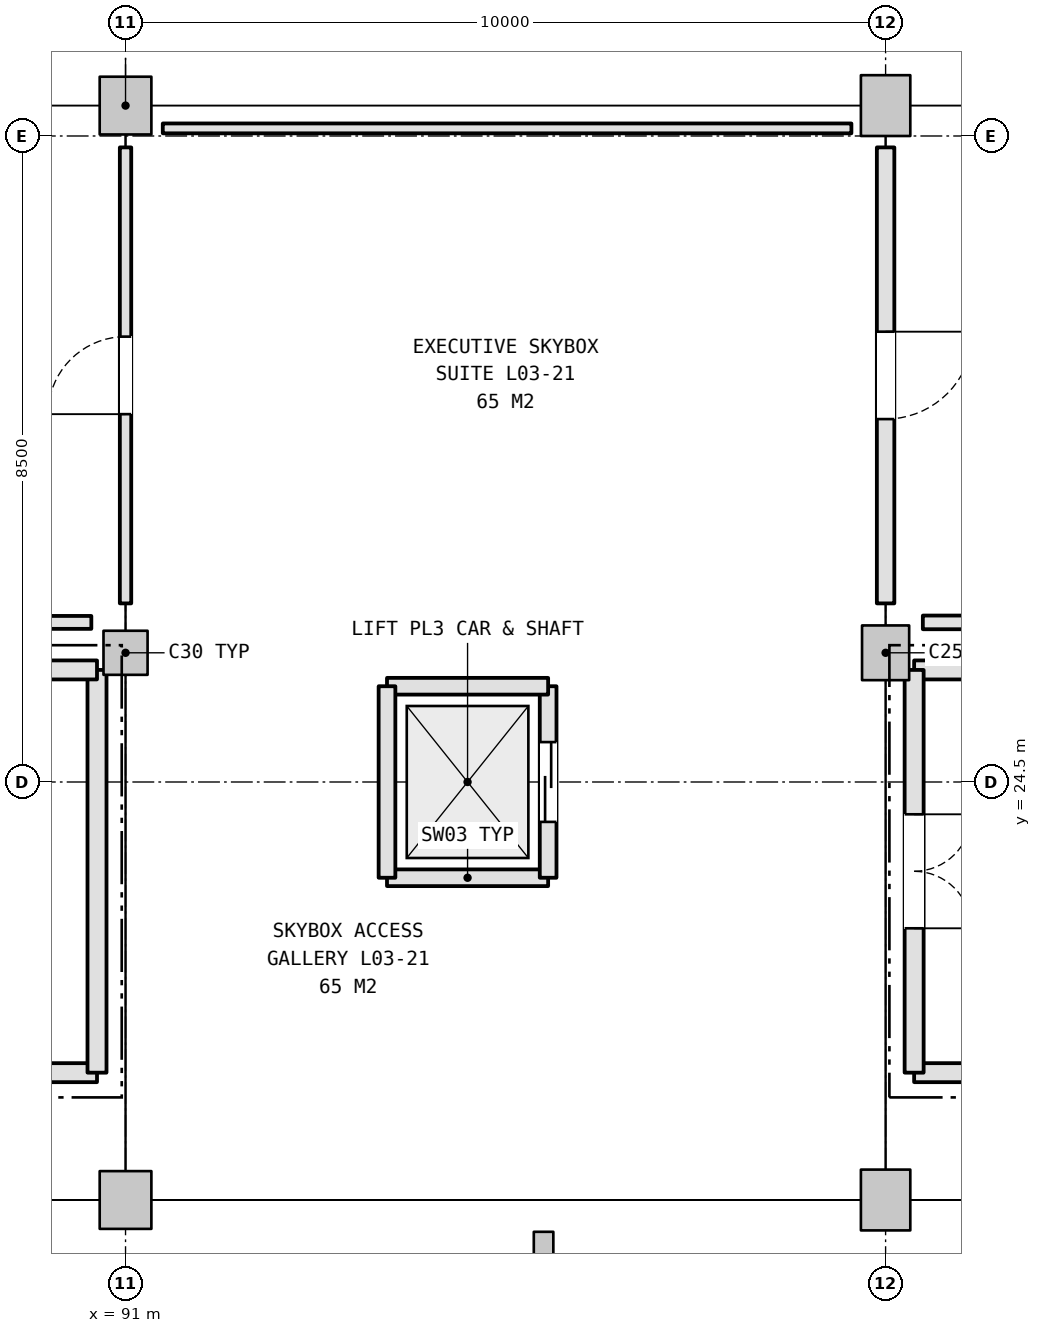
"""IFC4 building model, lengths in metres.
Left out: names, types, materials, properties, quantities, classifications, styles, units other than length and angle.
Written with IfcOpenShell. Run it as: python <this file> out.ifc"""

import sys

from ifc_helpers import new_model, si_unit, direction, frame, frame_2d, origin, origin_2d, place, context, subcontext, project, spatial, rectangle, i_section, extrude, element, fill, save


model = new_model("IFC4")
c1 = context("Model", 3, precision=1e-05, world=origin(), true_north=direction((0.0, 1.0)))
c2 = subcontext(c1, "Body", "Model", "MODEL_VIEW")
j1 = project(units=[si_unit("LENGTHUNIT", "METRE"), si_unit("PLANEANGLEUNIT", "RADIAN")], contexts=[c1])
p1 = place(None, origin())
s1 = spatial("IfcSite", under=j1, at=p1, CompositionType="ELEMENT")
p2 = place(p1, origin())
s2 = spatial("IfcBuilding", under=s1, at=p2, CompositionType="ELEMENT")
p3 = place(p2, frame((0.0, 0.0, 16.2)))
s3 = spatial("IfcBuildingStorey", under=s2, at=p3, CompositionType="ELEMENT", Elevation=16.2)
p4 = place(p3, frame((91.0, 33.4, 0.0), z_axis=(0.0, 0.0, 1.0), x_axis=(1.0, 0.0, 0.0)))
e1 = element("IfcColumn", 1, at=p4, inside=s3, PredefinedType="COLUMN", context=c2, shape_type="SweptSolid", body=[
    extrude(rectangle(XDim=0.68, YDim=0.76, at=origin_2d()), origin(), (0.0, 0.0, 1.0), 5.4),
])
p5 = place(p3, frame((91.0, 26.2, 0.0), z_axis=(0.0, 0.0, 1.0), x_axis=(1.0, 0.0, 0.0)))
e2 = element("IfcColumn", 2, at=p5, inside=s3, PredefinedType="COLUMN", context=c2, shape_type="SweptSolid", body=[
    extrude(rectangle(XDim=0.58, YDim=0.58, at=origin_2d()), origin(), (0.0, 0.0, 1.0), 5.4),
])
p6 = place(p3, frame((91.0, 19.0, 0.0), z_axis=(0.0, 0.0, 1.0), x_axis=(1.0, 0.0, 0.0)))
e3 = element("IfcColumn", 3, at=p6, inside=s3, PredefinedType="COLUMN", context=c2, shape_type="SweptSolid", body=[
    extrude(rectangle(XDim=0.68, YDim=0.76, at=origin_2d()), origin(), (0.0, 0.0, 1.0), 5.4),
])
p7 = place(p3, frame((101.0, 33.4, 0.0), z_axis=(0.0, 0.0, 1.0), x_axis=(1.0, 0.0, 0.0)))
e4 = element("IfcColumn", 4, at=p7, inside=s3, PredefinedType="COLUMN", context=c2, shape_type="SweptSolid", body=[
    extrude(rectangle(XDim=0.65, YDim=0.8, at=origin_2d()), origin(), (0.0, 0.0, 1.0), 5.4),
])
p8 = place(p3, frame((101.0, 26.2, 0.0), z_axis=(0.0, 0.0, 1.0), x_axis=(1.0, 0.0, 0.0)))
e5 = element("IfcColumn", 5, at=p8, inside=s3, PredefinedType="COLUMN", context=c2, shape_type="SweptSolid", body=[
    extrude(rectangle(XDim=0.62, YDim=0.72, at=origin_2d()), origin(), (0.0, 0.0, 1.0), 5.4),
])
p9 = place(p3, frame((101.0, 19.0, 0.0), z_axis=(0.0, 0.0, 1.0), x_axis=(1.0, 0.0, 0.0)))
e6 = element("IfcColumn", 6, at=p9, inside=s3, PredefinedType="COLUMN", context=c2, shape_type="SweptSolid", body=[
    extrude(rectangle(XDim=0.65, YDim=0.8, at=origin_2d()), origin(), (0.0, 0.0, 1.0), 5.4),
])
p10 = place(p3, frame((96.5, 18.4, 0.0), z_axis=(0.0, 0.0, 1.0), x_axis=(1.0, 0.0, 0.0)))
e7 = element("IfcColumn", 7, at=p10, inside=s3, PredefinedType="COLUMN", context=c2, shape_type="SweptSolid", body=[
    extrude(i_section(OverallWidth=0.257, OverallDepth=0.363, WebThickness=0.013, FlangeThickness=0.022, FilletRadius=0.015, at=origin_2d()), origin(), (0.0, 0.0, 1.0), 5.4),
])
p11 = place(p3, frame((81.375, 20.675, 0.0), z_axis=(0.0, 0.0, 1.0), x_axis=(1.0, 0.0, 0.0)))
e8 = element("IfcWall", 8, at=p11, inside=s3, PredefinedType="SHEAR", context=c2, shape_type="SweptSolid", body=[
    extrude(rectangle(XDim=9.249, YDim=0.25, at=frame_2d((4.625, 0.0))), origin(), (0.0, 0.0, 1.0), 5.14),
])
p12 = place(p3, frame((90.625, 20.675, 0.0), z_axis=(0.0, 0.0, 1.0), x_axis=(0.0, 1.0, 0.0)))
e9 = element("IfcWall", 9, at=p12, inside=s3, PredefinedType="SHEAR", context=c2, shape_type="SweptSolid", body=[
    extrude(rectangle(XDim=5.299, YDim=0.25, at=frame_2d((2.65, 0.0))), origin(), (0.0, 0.0, 1.0), 5.14),
])
for number, where, z_axis, x_axis in (
    (10, (90.625, 25.975, 0.0), (0.0, 0.0, 1.0), (-1.0, 0.0, 0.0)),
    (11, (101.375, 20.675, 0.0), (0.0, 0.0, 1.0), (1.0, 0.0, 0.0)),
    (12, (110.625, 25.975, 0.0), (0.0, 0.0, 1.0), (-1.0, 0.0, 0.0)),
):
    element("IfcWall", number, at=place(p3, frame(where, z_axis=z_axis, x_axis=x_axis)), inside=s3, PredefinedType="SHEAR", context=c2, shape_type="SweptSolid", body=[
        extrude(rectangle(XDim=9.249, YDim=0.25, at=frame_2d((4.625, 0.0))), origin(), (0.0, 0.0, 1.0), 5.14),
    ])
p13 = place(p3, frame((101.375, 25.975, 0.0), z_axis=(0.0, 0.0, 1.0), x_axis=(0.0, -1.0, 0.0)))
e13 = element("IfcWall", 13, at=p13, inside=s3, PredefinedType="SHEAR", context=c2, shape_type="SweptSolid", body=[
    extrude(rectangle(XDim=5.299, YDim=0.25, at=frame_2d((2.65, 0.0))), origin(), (0.0, 0.0, 1.0), 5.14),
])
p14 = place(p13, frame((1.9, 0.0, 0.0)))
e14 = element("IfcOpeningElement", 14, at=p14, cuts=e13, PredefinedType="OPENING", context=c2, shape_type="SweptSolid", body=[
    extrude(rectangle(XDim=1.5, YDim=2.2, at=frame_2d((0.75, 1.1))), frame((0.0, 0.135, 0.0), z_axis=(0.0, -1.0, 0.0), x_axis=(1.0, 0.0, 0.0)), (0.0, 0.0, 1.0), 0.27),
])
p15 = place(p3, frame((94.44, 23.24, 0.0), z_axis=(0.0, 0.0, 1.0), x_axis=(1.0, 0.0, 0.0)))
e15 = element("IfcWall", 15, at=p15, inside=s3, PredefinedType="SHEAR", context=c2, shape_type="SweptSolid", body=[
    extrude(rectangle(XDim=2.12, YDim=0.22, at=frame_2d((1.06, 0.0))), origin(), (0.0, 0.0, 1.0), 5.14),
])
p16 = place(p3, frame((96.56, 23.24, 0.0), z_axis=(0.0, 0.0, 1.0), x_axis=(0.0, 1.0, 0.0)))
e16 = element("IfcWall", 16, at=p16, inside=s3, PredefinedType="SHEAR", context=c2, shape_type="SweptSolid", body=[
    extrude(rectangle(XDim=2.52, YDim=0.22, at=frame_2d((1.26, 0.0))), origin(), (0.0, 0.0, 1.0), 5.14),
])
p17 = place(p16, frame((0.735, 0.0, 0.0)))
e17 = element("IfcOpeningElement", 17, at=p17, cuts=e16, PredefinedType="OPENING", context=c2, shape_type="SweptSolid", body=[
    extrude(rectangle(XDim=1.05, YDim=2.15, at=frame_2d((0.525, 1.075))), frame((0.0, 0.12, 0.0), z_axis=(0.0, -1.0, 0.0), x_axis=(1.0, 0.0, 0.0)), (0.0, 0.0, 1.0), 0.24),
])
p18 = place(p3, frame((96.56, 25.76, 0.0), z_axis=(0.0, 0.0, 1.0), x_axis=(-1.0, 0.0, 0.0)))
e18 = element("IfcWall", 18, at=p18, inside=s3, PredefinedType="SHEAR", context=c2, shape_type="SweptSolid", body=[
    extrude(rectangle(XDim=2.12, YDim=0.22, at=frame_2d((1.06, 0.0))), origin(), (0.0, 0.0, 1.0), 5.14),
])
p19 = place(p3, frame((94.44, 25.76, 0.0), z_axis=(0.0, 0.0, 1.0), x_axis=(0.0, -1.0, 0.0)))
e19 = element("IfcWall", 19, at=p19, inside=s3, PredefinedType="SHEAR", context=c2, shape_type="SweptSolid", body=[
    extrude(rectangle(XDim=2.52, YDim=0.22, at=frame_2d((1.26, 0.0))), origin(), (0.0, 0.0, 1.0), 5.14),
])
p20 = place(p3, frame((91.0, 32.85, 0.0), z_axis=(0.0, 0.0, 1.0), x_axis=(0.0, -1.0, 0.0)))
e20 = element("IfcWall", 20, at=p20, inside=s3, PredefinedType="PARTITIONING", context=c2, shape_type="SweptSolid", body=[
    extrude(rectangle(XDim=6.0, YDim=0.15, at=frame_2d((3.0, 0.0))), origin(), (0.0, 0.0, 1.0), 4.305),
])
p21 = place(p20, frame((2.49, 0.0, 0.0)))
e21 = element("IfcOpeningElement", 21, at=p21, cuts=e20, PredefinedType="OPENING", context=c2, shape_type="SweptSolid", body=[
    extrude(rectangle(XDim=1.02, YDim=2.15, at=frame_2d((0.51, 1.075))), frame((0.0, 0.085, 0.0), z_axis=(0.0, -1.0, 0.0), x_axis=(1.0, 0.0, 0.0)), (0.0, 0.0, 1.0), 0.17),
])
p22 = place(p3, frame((90.55, 26.6, 0.0), z_axis=(0.0, 0.0, 1.0), x_axis=(-1.0, 0.0, 0.0)))
e22 = element("IfcWall", 22, at=p22, inside=s3, PredefinedType="PARTITIONING", context=c2, shape_type="SweptSolid", body=[
    extrude(rectangle(XDim=9.06, YDim=0.17, at=frame_2d((4.53, 0.0))), origin(), (0.0, 0.0, 1.0), 5.12),
])
p23 = place(p3, frame((101.0, 32.85, 0.0), z_axis=(0.0, 0.0, 1.0), x_axis=(0.0, -1.0, 0.0)))
e23 = element("IfcWall", 23, at=p23, inside=s3, PredefinedType="PLUMBINGWALL", context=c2, shape_type="SweptSolid", body=[
    extrude(rectangle(XDim=6.0, YDim=0.23, at=frame_2d((3.0, 0.0))), origin(), (0.0, 0.0, 1.0), 4.345),
])
p24 = place(p23, frame((2.425, 0.0, 0.0)))
e24 = element("IfcOpeningElement", 24, at=p24, cuts=e23, PredefinedType="OPENING", context=c2, shape_type="SweptSolid", body=[
    extrude(rectangle(XDim=1.15, YDim=2.2, at=frame_2d((0.575, 1.1))), frame((0.0, 0.125, 0.0), z_axis=(0.0, -1.0, 0.0), x_axis=(1.0, 0.0, 0.0)), (0.0, 0.0, 1.0), 0.25),
])
p25 = place(p3, frame((91.49, 33.1, 0.0), z_axis=(0.0, 0.0, 1.0), x_axis=(1.0, 0.0, 0.0)))
e25 = element("IfcWall", 25, at=p25, inside=s3, PredefinedType="PARTITIONING", context=c2, shape_type="SweptSolid", body=[
    extrude(rectangle(XDim=9.06, YDim=0.13, at=frame_2d((4.53, 0.0))), origin(), (0.0, 0.0, 1.0), 4.505),
])
p26 = place(p3, frame((110.55, 26.6, 0.0), z_axis=(0.0, 0.0, 1.0), x_axis=(-1.0, 0.0, 0.0)))
e26 = element("IfcWall", 26, at=p26, inside=s3, PredefinedType="PARTITIONING", context=c2, shape_type="SweptSolid", body=[
    extrude(rectangle(XDim=9.06, YDim=0.18, at=frame_2d((4.53, 0.0))), origin(), (0.0, 0.0, 1.0), 5.12),
])
p27 = place(p14, origin())
e27 = element("IfcDoor", 27, at=p27, inside=s3, OperationType="DOUBLE_DOOR_SINGLE_SWING", PredefinedType="DOOR", context=c2, shape_type="SweptSolid", body=[
    extrude(rectangle(XDim=1.5, YDim=2.2, at=frame_2d((0.75, 1.1))), frame((0.0, 0.025, 0.0), z_axis=(0.0, -1.0, 0.0), x_axis=(1.0, 0.0, 0.0)), (0.0, 0.0, 1.0), 0.05),
])
fill(e14, e27)
p28 = place(p17, origin())
e28 = element("IfcDoor", 28, at=p28, inside=s3, OperationType="DOUBLE_DOOR_SLIDING", PredefinedType="DOOR", context=c2, shape_type="SweptSolid", body=[
    extrude(rectangle(XDim=1.05, YDim=2.15, at=frame_2d((0.525, 1.075))), frame((0.0, 0.025, 0.0), z_axis=(0.0, -1.0, 0.0), x_axis=(1.0, 0.0, 0.0)), (0.0, 0.0, 1.0), 0.05),
])
fill(e17, e28)
p29 = place(p21, frame((1.02, 0.0, 0.0), z_axis=(0.0, 0.0, 1.0), x_axis=(-1.0, 0.0, 0.0)))
e29 = element("IfcDoor", 29, at=p29, inside=s3, OperationType="SINGLE_SWING_RIGHT", PredefinedType="DOOR", context=c2, shape_type="SweptSolid", body=[
    extrude(rectangle(XDim=1.02, YDim=2.15, at=frame_2d((0.51, 1.075))), frame((0.0, 0.025, 0.0), z_axis=(0.0, -1.0, 0.0), x_axis=(1.0, 0.0, 0.0)), (0.0, 0.0, 1.0), 0.05),
])
fill(e21, e29)
p30 = place(p24, origin())
e30 = element("IfcDoor", 30, at=p30, inside=s3, OperationType="SINGLE_SWING_LEFT", PredefinedType="DOOR", context=c2, shape_type="SweptSolid", body=[
    extrude(rectangle(XDim=1.15, YDim=2.2, at=frame_2d((0.575, 1.1))), frame((0.0, 0.025, 0.0), z_axis=(0.0, -1.0, 0.0), x_axis=(1.0, 0.0, 0.0)), (0.0, 0.0, 1.0), 0.05),
])
fill(e24, e30)
save(model, sys.argv[1])
